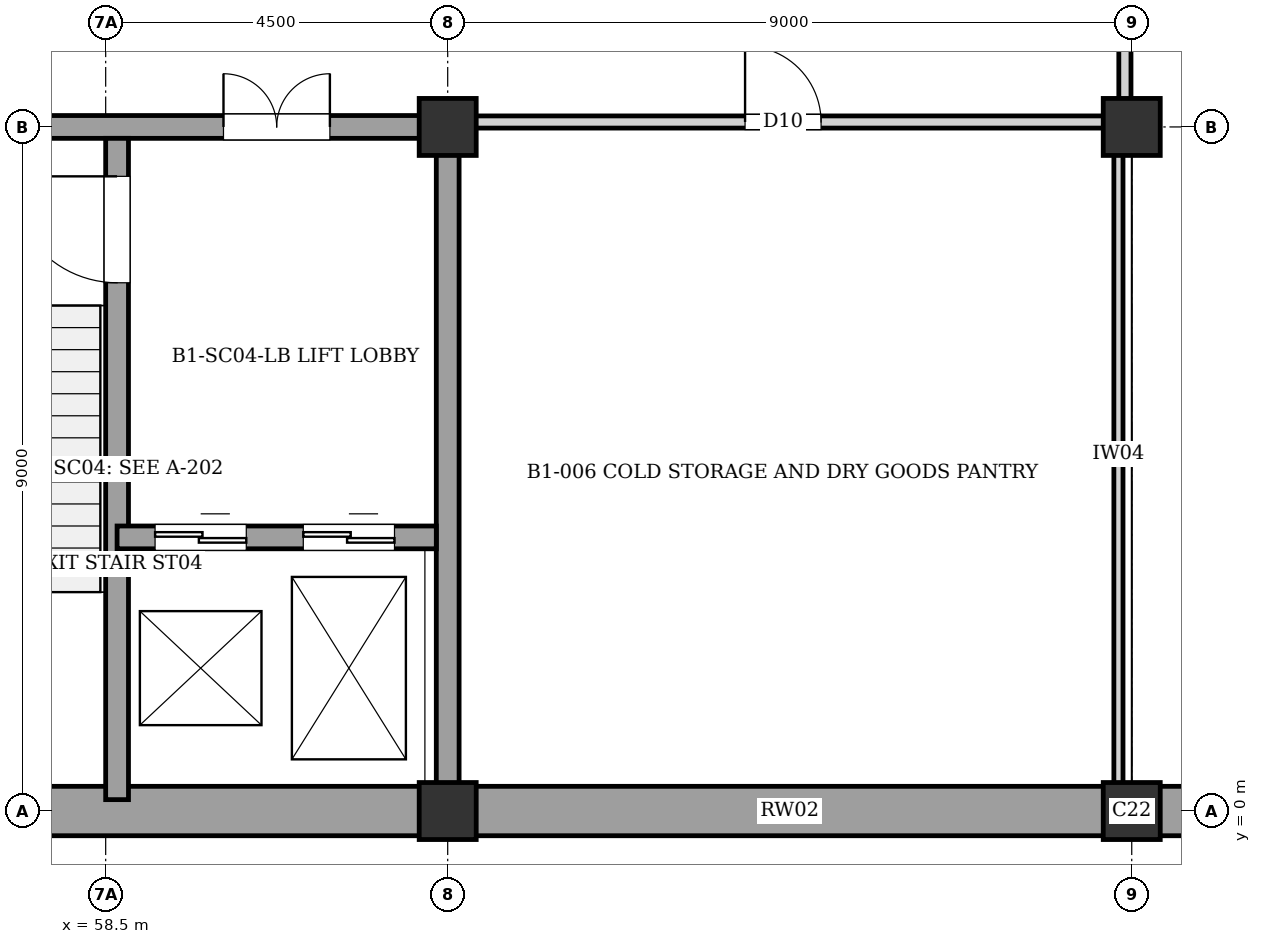
"""IFC4 building model, lengths in metres.
Left out: names, types, materials, properties, quantities, classifications, styles, units other than length and angle.
Written with IfcOpenShell. Run it as: python <this file> out.ifc"""

import sys

from ifc_helpers import new_model, si_unit, direction, frame, frame_2d, origin, origin_2d, place, context, subcontext, project, spatial, rectangle, extrude, element, fill, save


model = new_model("IFC4")
c1 = context("Model", 3, precision=1e-05, world=origin(), true_north=direction((0.0, 1.0)))
c2 = subcontext(c1, "Body", "Model", "MODEL_VIEW")
j1 = project(units=[si_unit("LENGTHUNIT", "METRE"), si_unit("PLANEANGLEUNIT", "RADIAN")], contexts=[c1])
p1 = place(None, origin())
s1 = spatial("IfcSite", under=j1, at=p1, CompositionType="ELEMENT")
p2 = place(p1, origin())
s2 = spatial("IfcBuilding", under=s1, at=p2, CompositionType="ELEMENT")
p3 = place(p2, frame((0.0, 0.0, -4.48)))
s3 = spatial("IfcBuildingStorey", under=s2, at=p3, CompositionType="ELEMENT", Elevation=-4.48)
for number, where, z_axis, x_axis in (
    (1, (63.0, 0.0, 0.0), (0.0, 0.0, 1.0), (1.0, 0.0, 0.0)),
    (2, (63.0, 9.0, 0.0), (0.0, 0.0, 1.0), (1.0, 0.0, 0.0)),
    (3, (72.0, 0.0, 0.0), (0.0, 0.0, 1.0), (1.0, 0.0, 0.0)),
    (4, (72.0, 9.0, 0.0), (0.0, 0.0, 1.0), (1.0, 0.0, 0.0)),
):
    element("IfcColumn", number, at=place(p3, frame(where, z_axis=z_axis, x_axis=x_axis)), inside=s3, PredefinedType="COLUMN", context=c2, shape_type="SweptSolid", body=[
        extrude(rectangle(XDim=0.75, YDim=0.75, at=origin_2d()), origin(), (0.0, 0.0, 1.0), 4.48),
    ])
for number, where, z_axis, x_axis in (
    (5, (72.0, 0.0, 0.0), (0.0, 0.0, 1.0), (-1.0, 0.0, 0.0)),
    (6, (63.0, 0.0, 0.0), (0.0, 0.0, 1.0), (-1.0, 0.0, 0.0)),
):
    element("IfcWall", number, at=place(p3, frame(where, z_axis=z_axis, x_axis=x_axis)), inside=s3, PredefinedType="USERDEFINED", context=c2, shape_type="SweptSolid", body=[
        extrude(rectangle(XDim=9.0, YDim=0.65, at=frame_2d((4.5, 0.0))), origin(), (0.0, 0.0, 1.0), 4.22),
    ])
p4 = place(p3, frame((81.0, 0.0, 0.0), z_axis=(0.0, 0.0, 1.0), x_axis=(-1.0, 0.0, 0.0)))
e7 = element("IfcWall", 7, at=p4, inside=s3, PredefinedType="USERDEFINED", context=c2, shape_type="SweptSolid", body=[
    extrude(rectangle(XDim=9.0, YDim=0.65, at=frame_2d((4.5, 0.0))), origin(), (0.0, 0.0, 1.0), 4.03),
])
p5 = place(p3, frame((63.0, 0.0, 0.0), z_axis=(0.0, 0.0, 1.0), x_axis=(0.0, 1.0, 0.0)))
e8 = element("IfcWall", 8, at=p5, inside=s3, PredefinedType="SHEAR", context=c2, shape_type="SweptSolid", body=[
    extrude(rectangle(XDim=9.0, YDim=0.3, at=frame_2d((4.5, 0.0))), origin(), (0.0, 0.0, 1.0), 4.22),
])
p6 = place(p3, frame((54.0, 9.0, 0.0), z_axis=(0.0, 0.0, 1.0), x_axis=(1.0, 0.0, 0.0)))
e9 = element("IfcWall", 9, at=p6, inside=s3, PredefinedType="SHEAR", context=c2, shape_type="SweptSolid", body=[
    extrude(rectangle(XDim=9.0, YDim=0.3, at=frame_2d((4.5, 0.0))), origin(), (0.0, 0.0, 1.0), 4.22),
])
p7 = place(p6, frame((6.05, 0.0, 0.0)))
e10 = element("IfcOpeningElement", 10, at=p7, cuts=e9, PredefinedType="OPENING", context=c2, shape_type="SweptSolid", body=[
    extrude(rectangle(XDim=1.4, YDim=2.02, at=frame_2d((0.7, 1.01))), frame((0.0, 0.16, 0.0), z_axis=(0.0, -1.0, 0.0), x_axis=(1.0, 0.0, 0.0)), (0.0, 0.0, 1.0), 0.32),
])
p8 = place(p3, frame((58.65, 0.15, 0.0), z_axis=(0.0, 0.0, 1.0), x_axis=(0.0, 1.0, 0.0)))
e11 = element("IfcWall", 11, at=p8, inside=s3, PredefinedType="SHEAR", context=c2, shape_type="SweptSolid", body=[
    extrude(rectangle(XDim=8.7, YDim=0.3, at=frame_2d((4.35, 0.0))), origin(), (0.0, 0.0, 1.0), 4.22),
])
p9 = place(p8, frame((6.8, 0.0, 0.0)))
e12 = element("IfcOpeningElement", 12, at=p9, cuts=e11, PredefinedType="OPENING", context=c2, shape_type="SweptSolid", body=[
    extrude(rectangle(XDim=1.4, YDim=2.02, at=frame_2d((0.7, 1.01))), frame((0.0, 0.16, 0.0), z_axis=(0.0, -1.0, 0.0), x_axis=(1.0, 0.0, 0.0)), (0.0, 0.0, 1.0), 0.32),
])
p10 = place(p3, frame((58.65, 3.6, 0.0), z_axis=(0.0, 0.0, 1.0), x_axis=(1.0, 0.0, 0.0)))
e13 = element("IfcWall", 13, at=p10, inside=s3, PredefinedType="SHEAR", context=c2, shape_type="SweptSolid", body=[
    extrude(rectangle(XDim=4.2, YDim=0.3, at=frame_2d((2.1, 0.0))), origin(), (0.0, 0.0, 1.0), 4.22),
])
p11 = place(p10, frame((0.5, 0.0, 0.0)))
e14 = element("IfcOpeningElement", 14, at=p11, cuts=e13, PredefinedType="OPENING", context=c2, shape_type="SweptSolid", body=[
    extrude(rectangle(XDim=1.2, YDim=2.2, at=frame_2d((0.6, 1.1))), frame((0.0, 0.16, 0.0), z_axis=(0.0, -1.0, 0.0), x_axis=(1.0, 0.0, 0.0)), (0.0, 0.0, 1.0), 0.32),
])
p12 = place(p10, frame((2.45, 0.0, 0.0)))
e15 = element("IfcOpeningElement", 15, at=p12, cuts=e13, PredefinedType="OPENING", context=c2, shape_type="SweptSolid", body=[
    extrude(rectangle(XDim=1.2, YDim=2.2, at=frame_2d((0.6, 1.1))), frame((0.0, 0.16, 0.0), z_axis=(0.0, -1.0, 0.0), x_axis=(1.0, 0.0, 0.0)), (0.0, 0.0, 1.0), 0.32),
])
p13 = place(p3, frame((71.91, 9.07, 0.0), z_axis=(0.0, 0.0, 1.0), x_axis=(0.0, 1.0, 0.0)))
e16 = element("IfcWall", 16, at=p13, inside=s3, PredefinedType="PARTITIONING", context=c2, shape_type="SweptSolid", body=[
    extrude(rectangle(XDim=2.86, YDim=0.16, at=frame_2d((1.43, 0.0))), origin(), (0.0, 0.0, 1.0), 3.32),
])
p14 = place(p3, frame((71.825, 0.33, 0.0), z_axis=(0.0, 0.0, 1.0), x_axis=(0.0, 1.0, 0.0)))
e17 = element("IfcWall", 17, at=p14, inside=s3, PredefinedType="PARTITIONING", context=c2, shape_type="SweptSolid", body=[
    extrude(rectangle(XDim=8.73, YDim=0.12, at=frame_2d((4.365, 0.0))), origin(), (0.0, 0.0, 1.0), 3.32),
])
p15 = place(p3, frame((63.155, 9.065, 0.0), z_axis=(0.0, 0.0, 1.0), x_axis=(1.0, 0.0, 0.0)))
e18 = element("IfcWall", 18, at=p15, inside=s3, PredefinedType="PARTITIONING", context=c2, shape_type="SweptSolid", body=[
    extrude(rectangle(XDim=8.515, YDim=0.16, at=frame_2d((4.257, 0.0))), origin(), (0.0, 0.0, 1.0), 3.32),
])
p16 = place(p15, frame((3.758, 0.0, 0.0)))
e19 = element("IfcOpeningElement", 19, at=p16, cuts=e18, PredefinedType="OPENING", context=c2, shape_type="SweptSolid", body=[
    extrude(rectangle(XDim=1.0, YDim=2.1, at=frame_2d((0.5, 1.05))), frame((0.0, 0.09, 0.0), z_axis=(0.0, -1.0, 0.0), x_axis=(1.0, 0.0, 0.0)), (0.0, 0.0, 1.0), 0.18),
])
p17 = place(p7, origin())
e20 = element("IfcDoor", 20, at=p17, inside=s3, OperationType="DOUBLE_DOOR_SINGLE_SWING", PredefinedType="DOOR", context=c2, shape_type="SweptSolid", body=[
    extrude(rectangle(XDim=1.4, YDim=2.02, at=frame_2d((0.7, 1.01))), frame((0.0, 0.025, 0.0), z_axis=(0.0, -1.0, 0.0), x_axis=(1.0, 0.0, 0.0)), (0.0, 0.0, 1.0), 0.05),
])
fill(e10, e20)
p18 = place(p9, origin())
e21 = element("IfcDoor", 21, at=p18, inside=s3, OperationType="SINGLE_SWING_RIGHT", PredefinedType="DOOR", context=c2, shape_type="SweptSolid", body=[
    extrude(rectangle(XDim=1.4, YDim=2.02, at=frame_2d((0.7, 1.01))), frame((0.0, 0.025, 0.0), z_axis=(0.0, -1.0, 0.0), x_axis=(1.0, 0.0, 0.0)), (0.0, 0.0, 1.0), 0.05),
])
fill(e12, e21)
p19 = place(p11, origin())
e22 = element("IfcDoor", 22, at=p19, inside=s3, OperationType="DOUBLE_DOOR_SLIDING", PredefinedType="DOOR", context=c2, shape_type="SweptSolid", body=[
    extrude(rectangle(XDim=1.2, YDim=2.2, at=frame_2d((0.6, 1.1))), frame((0.0, 0.025, 0.0), z_axis=(0.0, -1.0, 0.0), x_axis=(1.0, 0.0, 0.0)), (0.0, 0.0, 1.0), 0.05),
])
fill(e14, e22)
p20 = place(p12, origin())
e23 = element("IfcDoor", 23, at=p20, inside=s3, OperationType="DOUBLE_DOOR_SLIDING", PredefinedType="DOOR", context=c2, shape_type="SweptSolid", body=[
    extrude(rectangle(XDim=1.2, YDim=2.2, at=frame_2d((0.6, 1.1))), frame((0.0, 0.025, 0.0), z_axis=(0.0, -1.0, 0.0), x_axis=(1.0, 0.0, 0.0)), (0.0, 0.0, 1.0), 0.05),
])
fill(e15, e23)
p21 = place(p16, origin())
e24 = element("IfcDoor", 24, at=p21, inside=s3, OperationType="SINGLE_SWING_LEFT", PredefinedType="DOOR", context=c2, shape_type="SweptSolid", body=[
    extrude(rectangle(XDim=1.0, YDim=2.1, at=frame_2d((0.5, 1.05))), frame((0.0, 0.025, 0.0), z_axis=(0.0, -1.0, 0.0), x_axis=(1.0, 0.0, 0.0)), (0.0, 0.0, 1.0), 0.05),
])
fill(e19, e24)
save(model, sys.argv[1])
